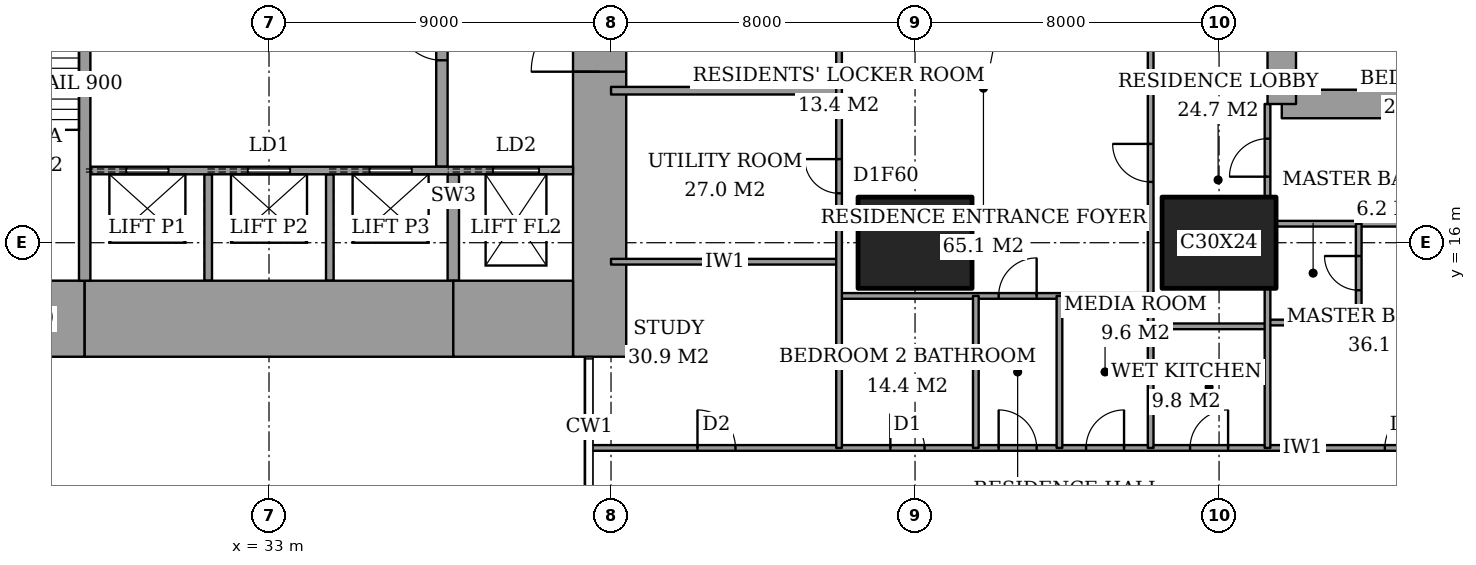
"""IFC4 building model, lengths in metres.
Left out: names, types, materials, properties, quantities, classifications, styles, units other than length and angle.
Written with IfcOpenShell. Run it as: python <this file> out.ifc"""

import sys

from ifc_helpers import new_model, si_unit, direction, frame, frame_2d, origin, origin_2d, place, context, subcontext, project, spatial, rectangle, extrude, element, fill, save


model = new_model("IFC4")
c1 = context("Model", 3, precision=1e-05, world=origin(), true_north=direction((0.0, 1.0)))
c2 = subcontext(c1, "Body", "Model", "MODEL_VIEW")
j1 = project(units=[si_unit("LENGTHUNIT", "METRE"), si_unit("PLANEANGLEUNIT", "RADIAN")], contexts=[c1])
p1 = place(None, origin())
s1 = spatial("IfcSite", under=j1, at=p1, CompositionType="ELEMENT")
p2 = place(p1, origin())
s2 = spatial("IfcBuilding", under=s1, at=p2, CompositionType="ELEMENT")
p3 = place(p2, frame((0.0, 0.0, 36.8)))
s3 = spatial("IfcBuildingStorey", under=s2, at=p3, CompositionType="ELEMENT", Elevation=36.8)
for number, where, z_axis, x_axis in (
    (1, (50.0, 16.0, 0.0), (0.0, 0.0, 1.0), (1.0, 0.0, 0.0)),
    (2, (58.0, 16.0, 0.0), (0.0, 0.0, 1.0), (1.0, 0.0, 0.0)),
):
    element("IfcColumn", number, at=place(p3, frame(where, z_axis=z_axis, x_axis=x_axis)), inside=s3, PredefinedType="COLUMN", context=c2, shape_type="SweptSolid", body=[
        extrude(rectangle(XDim=3.0, YDim=2.4, at=origin_2d()), origin(), (0.0, 0.0, 1.0), 3.6),
    ])
p4 = place(p3, frame((25.0, 14.0, 0.0), z_axis=(0.0, 0.0, 1.0), x_axis=(1.0, 0.0, 0.0)))
e3 = element("IfcWall", 3, at=p4, inside=s3, PredefinedType="SHEAR", context=c2, shape_type="SweptSolid", body=[
    extrude(rectangle(XDim=3.15, YDim=2.0, at=frame_2d((1.575, 0.0))), origin(), (0.0, 0.0, 1.0), 3.6),
])
p5 = place(p3, frame((28.15, 14.0, 0.0), z_axis=(0.0, 0.0, 1.0), x_axis=(1.0, 0.0, 0.0)))
e4 = element("IfcWall", 4, at=p5, inside=s3, PredefinedType="SHEAR", context=c2, shape_type="SweptSolid", body=[
    extrude(rectangle(XDim=9.7, YDim=2.0, at=frame_2d((4.85, 0.0))), origin(), (0.0, 0.0, 1.0), 3.6),
])
p6 = place(p3, frame((37.85, 14.0, 0.0), z_axis=(0.0, 0.0, 1.0), x_axis=(1.0, 0.0, 0.0)))
e5 = element("IfcWall", 5, at=p6, inside=s3, PredefinedType="SHEAR", context=c2, shape_type="SweptSolid", body=[
    extrude(rectangle(XDim=3.15, YDim=2.0, at=frame_2d((1.575, 0.0))), origin(), (0.0, 0.0, 1.0), 3.6),
])
p7 = place(p3, frame((41.7, 13.0, 0.0), z_axis=(0.0, 0.0, 1.0), x_axis=(0.0, 1.0, 0.0)))
e6 = element("IfcWall", 6, at=p7, inside=s3, PredefinedType="SHEAR", context=c2, shape_type="SweptSolid", body=[
    extrude(rectangle(XDim=11.85, YDim=1.4, at=frame_2d((5.925, 0.0))), origin(), (0.0, 0.0, 1.0), 3.6),
])
p8 = place(p7, frame((7.5, 0.0, 0.0)))
e7 = element("IfcOpeningElement", 7, at=p8, cuts=e6, PredefinedType="OPENING", context=c2, shape_type="SweptSolid", body=[
    extrude(rectangle(XDim=1.8, YDim=2.4, at=frame_2d((0.9, 1.2))), frame((0.0, 0.71, 0.0), z_axis=(0.0, -1.0, 0.0), x_axis=(1.0, 0.0, 0.0)), (0.0, 0.0, 1.0), 1.42),
])
p9 = place(p3, frame((28.15, 15.0, 0.0), z_axis=(0.0, 0.0, 1.0), x_axis=(0.0, 1.0, 0.0)))
e8 = element("IfcWall", 8, at=p9, inside=s3, PredefinedType="SHEAR", context=c2, shape_type="SweptSolid", body=[
    extrude(rectangle(XDim=8.15, YDim=0.3, at=frame_2d((4.075, 0.0))), origin(), (0.0, 0.0, 1.0), 3.6),
])
p10 = place(p3, frame((37.55, 18.0, 0.0), z_axis=(0.0, 0.0, 1.0), x_axis=(0.0, 1.0, 0.0)))
e9 = element("IfcWall", 9, at=p10, inside=s3, PredefinedType="PARTITIONING", context=c2, shape_type="SweptSolid", body=[
    extrude(rectangle(XDim=6.7, YDim=0.3, at=frame_2d((3.35, 0.0))), origin(), (0.0, 0.0, 1.0), 3.6),
])
p11 = place(p10, frame((2.8, 0.0, 0.0)))
e10 = element("IfcOpeningElement", 10, at=p11, cuts=e9, PredefinedType="OPENING", context=c2, shape_type="SweptSolid", body=[
    extrude(rectangle(XDim=1.2, YDim=2.1, at=frame_2d((0.6, 1.05))), frame((0.0, 0.16, 0.0), z_axis=(0.0, -1.0, 0.0), x_axis=(1.0, 0.0, 0.0)), (0.0, 0.0, 1.0), 0.32),
])
p12 = place(p3, frame((59.65, 19.65, 0.0), z_axis=(0.0, 0.0, 1.0), x_axis=(1.0, 0.0, 0.0)))
e11 = element("IfcWall", 11, at=p12, inside=s3, PredefinedType="SHEAR", context=c2, shape_type="SweptSolid", body=[
    extrude(rectangle(XDim=4.45, YDim=0.75, at=frame_2d((2.225, 0.0))), origin(), (0.0, 0.0, 1.0), 3.6),
])
p13 = place(p3, frame((59.65, 28.35, 0.0), z_axis=(0.0, 0.0, 1.0), x_axis=(0.0, -1.0, 0.0)))
e12 = element("IfcWall", 12, at=p13, inside=s3, PredefinedType="SHEAR", context=c2, shape_type="SweptSolid", body=[
    extrude(rectangle(XDim=8.7, YDim=0.75, at=frame_2d((4.35, 0.0))), origin(), (0.0, 0.0, 1.0), 3.6),
])
p14 = place(p13, frame((0.975, 0.0, 0.0)))
e13 = element("IfcOpeningElement", 13, at=p14, cuts=e12, PredefinedType="OPENING", context=c2, shape_type="SweptSolid", body=[
    extrude(rectangle(XDim=1.0, YDim=2.1, at=frame_2d((0.5, 1.05))), frame((0.0, 0.385, 0.0), z_axis=(0.0, -1.0, 0.0), x_axis=(1.0, 0.0, 0.0)), (0.0, 0.0, 1.0), 0.77),
])
p15 = place(p3, frame((41.439, 10.6, 0.0), z_axis=(0.0, 0.0, 1.0), x_axis=(1.0, 0.0, 0.0)))
e14 = element("IfcWall", 14, at=p15, inside=s3, PredefinedType="PARTITIONING", context=c2, shape_type="SweptSolid", body=[
    extrude(rectangle(XDim=25.011, YDim=0.15, at=frame_2d((12.505, 0.0))), origin(), (0.0, 0.0, 1.0), 3.35),
])
p16 = place(p15, frame((10.761, 0.0, 0.0)))
e15 = element("IfcOpeningElement", 15, at=p16, cuts=e14, PredefinedType="OPENING", context=c2, shape_type="SweptSolid", body=[
    extrude(rectangle(XDim=1.0, YDim=2.1, at=frame_2d((0.5, 1.05))), frame((0.0, 0.085, 0.0), z_axis=(0.0, -1.0, 0.0), x_axis=(1.0, 0.0, 0.0)), (0.0, 0.0, 1.0), 0.17),
])
p17 = place(p15, frame((20.924, 0.0, 0.0)))
e16 = element("IfcOpeningElement", 16, at=p17, cuts=e14, PredefinedType="OPENING", context=c2, shape_type="SweptSolid", body=[
    extrude(rectangle(XDim=1.0, YDim=2.1, at=frame_2d((0.5, 1.05))), frame((0.0, 0.085, 0.0), z_axis=(0.0, -1.0, 0.0), x_axis=(1.0, 0.0, 0.0)), (0.0, 0.0, 1.0), 0.17),
])
p18 = place(p15, frame((15.799, 0.0, 0.0)))
e17 = element("IfcOpeningElement", 17, at=p18, cuts=e14, PredefinedType="OPENING", context=c2, shape_type="SweptSolid", body=[
    extrude(rectangle(XDim=1.0, YDim=2.1, at=frame_2d((0.5, 1.05))), frame((0.0, 0.085, 0.0), z_axis=(0.0, -1.0, 0.0), x_axis=(1.0, 0.0, 0.0)), (0.0, 0.0, 1.0), 0.17),
])
p19 = place(p15, frame((13.061, 0.0, 0.0)))
e18 = element("IfcOpeningElement", 18, at=p19, cuts=e14, PredefinedType="OPENING", context=c2, shape_type="SweptSolid", body=[
    extrude(rectangle(XDim=1.0, YDim=2.1, at=frame_2d((0.5, 1.05))), frame((0.0, 0.085, 0.0), z_axis=(0.0, -1.0, 0.0), x_axis=(1.0, 0.0, 0.0)), (0.0, 0.0, 1.0), 0.17),
])
p20 = place(p15, frame((7.911, 0.0, 0.0)))
e19 = element("IfcOpeningElement", 19, at=p20, cuts=e14, PredefinedType="OPENING", context=c2, shape_type="SweptSolid", body=[
    extrude(rectangle(XDim=0.9, YDim=2.1, at=frame_2d((0.45, 1.05))), frame((0.0, 0.085, 0.0), z_axis=(0.0, -1.0, 0.0), x_axis=(1.0, 0.0, 0.0)), (0.0, 0.0, 1.0), 0.17),
])
p21 = place(p15, frame((2.836, 0.0, 0.0)))
e20 = element("IfcOpeningElement", 20, at=p21, cuts=e14, PredefinedType="OPENING", context=c2, shape_type="SweptSolid", body=[
    extrude(rectangle(XDim=1.0, YDim=2.1, at=frame_2d((0.5, 1.05))), frame((0.0, 0.085, 0.0), z_axis=(0.0, -1.0, 0.0), x_axis=(1.0, 0.0, 0.0)), (0.0, 0.0, 1.0), 0.17),
])
p22 = place(p3, frame((56.2, 13.8, 0.0), z_axis=(0.0, 0.0, 1.0), x_axis=(1.0, 0.0, 0.0)))
e21 = element("IfcWall", 21, at=p22, inside=s3, PredefinedType="PARTITIONING", context=c2, shape_type="SweptSolid", body=[
    extrude(rectangle(XDim=3.075, YDim=0.15, at=frame_2d((1.538, 0.0))), origin(), (0.0, 0.0, 1.0), 3.35),
])
p23 = place(p3, frame((59.275, 13.9, 0.0), z_axis=(0.0, 0.0, 1.0), x_axis=(1.0, 0.0, 0.0)))
e22 = element("IfcWall", 22, at=p23, inside=s3, PredefinedType="PARTITIONING", context=c2, shape_type="SweptSolid", body=[
    extrude(rectangle(XDim=2.4, YDim=0.15, at=frame_2d((1.2, 0.0))), origin(), (0.0, 0.0, 1.0), 3.35),
])
p24 = place(p3, frame((48.0, 14.6, 0.0), z_axis=(0.0, 0.0, 1.0), x_axis=(1.0, 0.0, 0.0)))
e23 = element("IfcWall", 23, at=p24, inside=s3, PredefinedType="PARTITIONING", context=c2, shape_type="SweptSolid", body=[
    extrude(rectangle(XDim=8.2, YDim=0.15, at=frame_2d((4.1, 0.0))), origin(), (0.0, 0.0, 1.0), 3.35),
])
p25 = place(p24, frame((4.2, 0.0, 0.0)))
e24 = element("IfcOpeningElement", 24, at=p25, cuts=e23, PredefinedType="OPENING", context=c2, shape_type="SweptSolid", body=[
    extrude(rectangle(XDim=1.0, YDim=2.1, at=frame_2d((0.5, 1.05))), frame((0.0, 0.085, 0.0), z_axis=(0.0, -1.0, 0.0), x_axis=(1.0, 0.0, 0.0)), (0.0, 0.0, 1.0), 0.17),
])
p26 = place(p3, frame((42.0, 15.5, 0.0), z_axis=(0.0, 0.0, 1.0), x_axis=(1.0, 0.0, 0.0)))
e25 = element("IfcWall", 25, at=p26, inside=s3, PredefinedType="PARTITIONING", context=c2, shape_type="SweptSolid", body=[
    extrude(rectangle(XDim=6.0, YDim=0.15, at=frame_2d((3.0, 0.0))), origin(), (0.0, 0.0, 1.0), 3.35),
])
p27 = place(p3, frame((59.5, 16.5, 0.0), z_axis=(0.0, 0.0, 1.0), x_axis=(1.0, 0.0, 0.0)))
e26 = element("IfcWall", 26, at=p27, inside=s3, PredefinedType="PARTITIONING", context=c2, shape_type="SweptSolid", body=[
    extrude(rectangle(XDim=5.15, YDim=0.15, at=frame_2d((2.575, 0.0))), origin(), (0.0, 0.0, 1.0), 3.35),
])
p28 = place(p3, frame((42.0, 20.0, 0.0), z_axis=(0.0, 0.0, 1.0), x_axis=(1.0, 0.0, 0.0)))
e27 = element("IfcWall", 27, at=p28, inside=s3, PredefinedType="PARTITIONING", context=c2, shape_type="SweptSolid", body=[
    extrude(rectangle(XDim=6.0, YDim=0.2, at=frame_2d((3.0, 0.0))), origin(), (0.0, 0.0, 1.0), 3.35),
])
p29 = place(p3, frame((48.0, 10.6, 0.0), z_axis=(0.0, 0.0, 1.0), x_axis=(0.0, 1.0, 0.0)))
e28 = element("IfcWall", 28, at=p29, inside=s3, PredefinedType="PARTITIONING", context=c2, shape_type="SweptSolid", body=[
    extrude(rectangle(XDim=13.4, YDim=0.15, at=frame_2d((6.7, 0.0))), origin(), (0.0, 0.0, 1.0), 3.35),
])
p30 = place(p29, frame((10.8, 0.0, 0.0)))
e29 = element("IfcOpeningElement", 29, at=p30, cuts=e28, PredefinedType="OPENING", context=c2, shape_type="SweptSolid", body=[
    extrude(rectangle(XDim=1.2, YDim=2.4, at=frame_2d((0.6, 1.2))), frame((0.0, 0.085, 0.0), z_axis=(0.0, -1.0, 0.0), x_axis=(1.0, 0.0, 0.0)), (0.0, 0.0, 1.0), 0.17),
])
p31 = place(p29, frame((6.7, 0.0, 0.0)))
e30 = element("IfcOpeningElement", 30, at=p31, cuts=e28, PredefinedType="OPENING", context=c2, shape_type="SweptSolid", body=[
    extrude(rectangle(XDim=0.9, YDim=2.1, at=frame_2d((0.45, 1.05))), frame((0.0, 0.085, 0.0), z_axis=(0.0, -1.0, 0.0), x_axis=(1.0, 0.0, 0.0)), (0.0, 0.0, 1.0), 0.17),
])
for number, where, z_axis, x_axis in (
    (31, (51.6, 10.6, 0.0), (0.0, 0.0, 1.0), (0.0, 1.0, 0.0)),
    (32, (53.8, 10.6, 0.0), (0.0, 0.0, 1.0), (0.0, 1.0, 0.0)),
):
    element("IfcWall", number, at=place(p3, frame(where, z_axis=z_axis, x_axis=x_axis)), inside=s3, PredefinedType="PARTITIONING", context=c2, shape_type="SweptSolid", body=[
        extrude(rectangle(XDim=4.0, YDim=0.15, at=frame_2d((2.0, 0.0))), origin(), (0.0, 0.0, 1.0), 3.35),
    ])
p32 = place(p3, frame((56.2, 10.6, 0.0), z_axis=(0.0, 0.0, 1.0), x_axis=(0.0, 1.0, 0.0)))
e33 = element("IfcWall", 33, at=p32, inside=s3, PredefinedType="PARTITIONING", context=c2, shape_type="SweptSolid", body=[
    extrude(rectangle(XDim=11.0, YDim=0.15, at=frame_2d((5.5, 0.0))), origin(), (0.0, 0.0, 1.0), 3.35),
])
p33 = place(p32, frame((7.0, 0.0, 0.0)))
e34 = element("IfcOpeningElement", 34, at=p33, cuts=e33, PredefinedType="OPENING", context=c2, shape_type="SweptSolid", body=[
    extrude(rectangle(XDim=1.0, YDim=2.1, at=frame_2d((0.5, 1.05))), frame((0.0, 0.085, 0.0), z_axis=(0.0, -1.0, 0.0), x_axis=(1.0, 0.0, 0.0)), (0.0, 0.0, 1.0), 0.17),
])
p34 = place(p3, frame((59.275, 10.6, 0.0), z_axis=(0.0, 0.0, 1.0), x_axis=(0.0, 1.0, 0.0)))
e35 = element("IfcWall", 35, at=p34, inside=s3, PredefinedType="PARTITIONING", context=c2, shape_type="SweptSolid", body=[
    extrude(rectangle(XDim=4.2, YDim=0.15, at=frame_2d((2.1, 0.0))), origin(), (0.0, 0.0, 1.0), 3.35),
])
p35 = place(p3, frame((59.275, 17.2, 0.0), z_axis=(0.0, 0.0, 1.0), x_axis=(0.0, 1.0, 0.0)))
e36 = element("IfcWall", 36, at=p35, inside=s3, PredefinedType="PARTITIONING", context=c2, shape_type="SweptSolid", body=[
    extrude(rectangle(XDim=2.45, YDim=0.15, at=frame_2d((1.225, 0.0))), origin(), (0.0, 0.0, 1.0), 3.35),
])
p36 = place(p35, frame((0.538, 0.0, 0.0)))
e37 = element("IfcOpeningElement", 37, at=p36, cuts=e36, PredefinedType="OPENING", context=c2, shape_type="SweptSolid", body=[
    extrude(rectangle(XDim=1.0, YDim=2.1, at=frame_2d((0.5, 1.05))), frame((0.0, 0.085, 0.0), z_axis=(0.0, -1.0, 0.0), x_axis=(1.0, 0.0, 0.0)), (0.0, 0.0, 1.0), 0.17),
])
p37 = place(p3, frame((61.675, 13.9, 0.0), z_axis=(0.0, 0.0, 1.0), x_axis=(0.0, 1.0, 0.0)))
e38 = element("IfcWall", 38, at=p37, inside=s3, PredefinedType="PARTITIONING", context=c2, shape_type="SweptSolid", body=[
    extrude(rectangle(XDim=2.6, YDim=0.15, at=frame_2d((1.3, 0.0))), origin(), (0.0, 0.0, 1.0), 3.35),
])
p38 = place(p37, frame((0.85, 0.0, 0.0)))
e39 = element("IfcOpeningElement", 39, at=p38, cuts=e38, PredefinedType="OPENING", context=c2, shape_type="SweptSolid", body=[
    extrude(rectangle(XDim=0.9, YDim=2.1, at=frame_2d((0.45, 1.05))), frame((0.0, 0.085, 0.0), z_axis=(0.0, -1.0, 0.0), x_axis=(1.0, 0.0, 0.0)), (0.0, 0.0, 1.0), 0.17),
])
p39 = place(p3, frame((28.3, 17.9, 0.0), z_axis=(0.0, 0.0, 1.0), x_axis=(1.0, 0.0, 0.0)))
e40 = element("IfcWall", 40, at=p39, inside=s3, PredefinedType="PARTITIONING", context=c2, shape_type="SweptSolid", body=[
    extrude(rectangle(XDim=12.7, YDim=0.2, at=frame_2d((6.35, 0.0))), origin(), (0.0, 0.0, 1.0), 3.6),
])
p40 = place(p39, frame((0.95, 0.0, 0.0)))
e41 = element("IfcOpeningElement", 41, at=p40, cuts=e40, PredefinedType="OPENING", context=c2, shape_type="SweptSolid", body=[
    extrude(rectangle(XDim=1.1, YDim=2.1, at=frame_2d((0.55, 1.05))), frame((0.0, 0.11, 0.0), z_axis=(0.0, -1.0, 0.0), x_axis=(1.0, 0.0, 0.0)), (0.0, 0.0, 1.0), 0.22),
])
p41 = place(p39, frame((4.15, 0.0, 0.0)))
e42 = element("IfcOpeningElement", 42, at=p41, cuts=e40, PredefinedType="OPENING", context=c2, shape_type="SweptSolid", body=[
    extrude(rectangle(XDim=1.1, YDim=2.1, at=frame_2d((0.55, 1.05))), frame((0.0, 0.11, 0.0), z_axis=(0.0, -1.0, 0.0), x_axis=(1.0, 0.0, 0.0)), (0.0, 0.0, 1.0), 0.22),
])
p42 = place(p39, frame((7.35, 0.0, 0.0)))
e43 = element("IfcOpeningElement", 43, at=p42, cuts=e40, PredefinedType="OPENING", context=c2, shape_type="SweptSolid", body=[
    extrude(rectangle(XDim=1.1, YDim=2.1, at=frame_2d((0.55, 1.05))), frame((0.0, 0.11, 0.0), z_axis=(0.0, -1.0, 0.0), x_axis=(1.0, 0.0, 0.0)), (0.0, 0.0, 1.0), 0.22),
])
p43 = place(p39, frame((10.6, 0.0, 0.0)))
e44 = element("IfcOpeningElement", 44, at=p43, cuts=e40, PredefinedType="OPENING", context=c2, shape_type="SweptSolid", body=[
    extrude(rectangle(XDim=1.2, YDim=2.1, at=frame_2d((0.6, 1.05))), frame((0.0, 0.11, 0.0), z_axis=(0.0, -1.0, 0.0), x_axis=(1.0, 0.0, 0.0)), (0.0, 0.0, 1.0), 0.22),
])
for number, where, z_axis, x_axis in (
    (45, (31.4, 15.0, 0.0), (0.0, 0.0, 1.0), (0.0, 1.0, 0.0)),
    (46, (34.6, 15.0, 0.0), (0.0, 0.0, 1.0), (0.0, 1.0, 0.0)),
):
    element("IfcWall", number, at=place(p3, frame(where, z_axis=z_axis, x_axis=x_axis)), inside=s3, PredefinedType="PARTITIONING", context=c2, shape_type="SweptSolid", body=[
        extrude(rectangle(XDim=2.8, YDim=0.2, at=frame_2d((1.4, 0.0))), origin(), (0.0, 0.0, 1.0), 3.6),
    ])
p44 = place(p3, frame((37.85, 15.0, 0.0), z_axis=(0.0, 0.0, 1.0), x_axis=(0.0, 1.0, 0.0)))
e47 = element("IfcWall", 47, at=p44, inside=s3, PredefinedType="SHEAR", context=c2, shape_type="SweptSolid", body=[
    extrude(rectangle(XDim=2.8, YDim=0.3, at=frame_2d((1.4, 0.0))), origin(), (0.0, 0.0, 1.0), 3.6),
])
p45 = place(p16, origin())
e48 = element("IfcDoor", 48, at=p45, inside=s3, OperationType="SINGLE_SWING_RIGHT", PredefinedType="DOOR", context=c2, shape_type="SweptSolid", body=[
    extrude(rectangle(XDim=1.0, YDim=2.1, at=frame_2d((0.5, 1.05))), frame((0.0, 0.025, 0.0), z_axis=(0.0, -1.0, 0.0), x_axis=(1.0, 0.0, 0.0)), (0.0, 0.0, 1.0), 0.05),
])
fill(e15, e48)
p46 = place(p38, origin())
e49 = element("IfcDoor", 49, at=p46, inside=s3, OperationType="SINGLE_SWING_LEFT", PredefinedType="DOOR", context=c2, shape_type="SweptSolid", body=[
    extrude(rectangle(XDim=0.9, YDim=2.1, at=frame_2d((0.45, 1.05))), frame((0.0, 0.025, 0.0), z_axis=(0.0, -1.0, 0.0), x_axis=(1.0, 0.0, 0.0)), (0.0, 0.0, 1.0), 0.05),
])
fill(e39, e49)
p47 = place(p17, origin())
e50 = element("IfcDoor", 50, at=p47, inside=s3, OperationType="SINGLE_SWING_LEFT", PredefinedType="DOOR", context=c2, shape_type="SweptSolid", body=[
    extrude(rectangle(XDim=1.0, YDim=2.1, at=frame_2d((0.5, 1.05))), frame((0.0, 0.025, 0.0), z_axis=(0.0, -1.0, 0.0), x_axis=(1.0, 0.0, 0.0)), (0.0, 0.0, 1.0), 0.05),
])
fill(e16, e50)
p48 = place(p36, origin())
e51 = element("IfcDoor", 51, at=p48, inside=s3, OperationType="SINGLE_SWING_RIGHT", PredefinedType="DOOR", context=c2, shape_type="SweptSolid", body=[
    extrude(rectangle(XDim=1.0, YDim=2.1, at=frame_2d((0.5, 1.05))), frame((0.0, 0.025, 0.0), z_axis=(0.0, -1.0, 0.0), x_axis=(1.0, 0.0, 0.0)), (0.0, 0.0, 1.0), 0.05),
])
fill(e37, e51)
p49 = place(p18, origin())
e52 = element("IfcDoor", 52, at=p49, inside=s3, OperationType="SINGLE_SWING_LEFT", PredefinedType="DOOR", context=c2, shape_type="SweptSolid", body=[
    extrude(rectangle(XDim=1.0, YDim=2.1, at=frame_2d((0.5, 1.05))), frame((0.0, 0.025, 0.0), z_axis=(0.0, -1.0, 0.0), x_axis=(1.0, 0.0, 0.0)), (0.0, 0.0, 1.0), 0.05),
])
fill(e17, e52)
p50 = place(p33, origin())
e53 = element("IfcDoor", 53, at=p50, inside=s3, OperationType="SINGLE_SWING_LEFT", PredefinedType="DOOR", context=c2, shape_type="SweptSolid", body=[
    extrude(rectangle(XDim=1.0, YDim=2.1, at=frame_2d((0.5, 1.05))), frame((0.0, 0.025, 0.0), z_axis=(0.0, -1.0, 0.0), x_axis=(1.0, 0.0, 0.0)), (0.0, 0.0, 1.0), 0.05),
])
fill(e34, e53)
p51 = place(p19, origin())
e54 = element("IfcDoor", 54, at=p51, inside=s3, OperationType="SINGLE_SWING_LEFT", PredefinedType="DOOR", context=c2, shape_type="SweptSolid", body=[
    extrude(rectangle(XDim=1.0, YDim=2.1, at=frame_2d((0.5, 1.05))), frame((0.0, 0.025, 0.0), z_axis=(0.0, -1.0, 0.0), x_axis=(1.0, 0.0, 0.0)), (0.0, 0.0, 1.0), 0.05),
])
fill(e18, e54)
p52 = place(p25, origin())
e55 = element("IfcDoor", 55, at=p52, inside=s3, OperationType="SINGLE_SWING_LEFT", PredefinedType="DOOR", context=c2, shape_type="SweptSolid", body=[
    extrude(rectangle(XDim=1.0, YDim=2.1, at=frame_2d((0.5, 1.05))), frame((0.0, 0.025, 0.0), z_axis=(0.0, -1.0, 0.0), x_axis=(1.0, 0.0, 0.0)), (0.0, 0.0, 1.0), 0.05),
])
fill(e24, e55)
p53 = place(p20, origin())
e56 = element("IfcDoor", 56, at=p53, inside=s3, OperationType="SINGLE_SWING_RIGHT", PredefinedType="DOOR", context=c2, shape_type="SweptSolid", body=[
    extrude(rectangle(XDim=0.9, YDim=2.1, at=frame_2d((0.45, 1.05))), frame((0.0, 0.025, 0.0), z_axis=(0.0, -1.0, 0.0), x_axis=(1.0, 0.0, 0.0)), (0.0, 0.0, 1.0), 0.05),
])
fill(e19, e56)
p54 = place(p21, origin())
e57 = element("IfcDoor", 57, at=p54, inside=s3, OperationType="SINGLE_SWING_RIGHT", PredefinedType="DOOR", context=c2, shape_type="SweptSolid", body=[
    extrude(rectangle(XDim=1.0, YDim=2.1, at=frame_2d((0.5, 1.05))), frame((0.0, 0.025, 0.0), z_axis=(0.0, -1.0, 0.0), x_axis=(1.0, 0.0, 0.0)), (0.0, 0.0, 1.0), 0.05),
])
fill(e20, e57)
p55 = place(p31, origin())
e58 = element("IfcDoor", 58, at=p55, inside=s3, OperationType="SINGLE_SWING_LEFT", PredefinedType="DOOR", context=c2, shape_type="SweptSolid", body=[
    extrude(rectangle(XDim=0.9, YDim=2.1, at=frame_2d((0.45, 1.05))), frame((0.0, 0.025, 0.0), z_axis=(0.0, -1.0, 0.0), x_axis=(1.0, 0.0, 0.0)), (0.0, 0.0, 1.0), 0.05),
])
fill(e30, e58)
p56 = place(p11, origin())
e59 = element("IfcDoor", 59, at=p56, inside=s3, OperationType="SINGLE_SWING_LEFT", PredefinedType="DOOR", context=c2, shape_type="SweptSolid", body=[
    extrude(rectangle(XDim=1.2, YDim=2.1, at=frame_2d((0.6, 1.05))), frame((0.0, 0.025, 0.0), z_axis=(0.0, -1.0, 0.0), x_axis=(1.0, 0.0, 0.0)), (0.0, 0.0, 1.0), 0.05),
])
fill(e10, e59)
p57 = place(p8, origin())
e60 = element("IfcDoor", 60, at=p57, inside=s3, OperationType="DOUBLE_DOOR_DOUBLE_SWING", PredefinedType="DOOR", context=c2, shape_type="SweptSolid", body=[
    extrude(rectangle(XDim=1.8, YDim=2.4, at=frame_2d((0.9, 1.2))), frame((0.0, 0.025, 0.0), z_axis=(0.0, -1.0, 0.0), x_axis=(1.0, 0.0, 0.0)), (0.0, 0.0, 1.0), 0.05),
])
fill(e7, e60)
p58 = place(p40, origin())
e61 = element("IfcDoor", 61, at=p58, inside=s3, OperationType="SLIDING_TO_LEFT", PredefinedType="DOOR", context=c2, shape_type="SweptSolid", body=[
    extrude(rectangle(XDim=1.1, YDim=2.1, at=frame_2d((0.55, 1.05))), frame((0.0, 0.025, 0.0), z_axis=(0.0, -1.0, 0.0), x_axis=(1.0, 0.0, 0.0)), (0.0, 0.0, 1.0), 0.05),
])
fill(e41, e61)
p59 = place(p41, origin())
e62 = element("IfcDoor", 62, at=p59, inside=s3, OperationType="SLIDING_TO_LEFT", PredefinedType="DOOR", context=c2, shape_type="SweptSolid", body=[
    extrude(rectangle(XDim=1.1, YDim=2.1, at=frame_2d((0.55, 1.05))), frame((0.0, 0.025, 0.0), z_axis=(0.0, -1.0, 0.0), x_axis=(1.0, 0.0, 0.0)), (0.0, 0.0, 1.0), 0.05),
])
fill(e42, e62)
p60 = place(p42, origin())
e63 = element("IfcDoor", 63, at=p60, inside=s3, OperationType="SLIDING_TO_LEFT", PredefinedType="DOOR", context=c2, shape_type="SweptSolid", body=[
    extrude(rectangle(XDim=1.1, YDim=2.1, at=frame_2d((0.55, 1.05))), frame((0.0, 0.025, 0.0), z_axis=(0.0, -1.0, 0.0), x_axis=(1.0, 0.0, 0.0)), (0.0, 0.0, 1.0), 0.05),
])
fill(e43, e63)
p61 = place(p43, origin())
e64 = element("IfcDoor", 64, at=p61, inside=s3, OperationType="SLIDING_TO_LEFT", PredefinedType="DOOR", context=c2, shape_type="SweptSolid", body=[
    extrude(rectangle(XDim=1.2, YDim=2.1, at=frame_2d((0.6, 1.05))), frame((0.0, 0.025, 0.0), z_axis=(0.0, -1.0, 0.0), x_axis=(1.0, 0.0, 0.0)), (0.0, 0.0, 1.0), 0.05),
])
fill(e44, e64)
save(model, sys.argv[1])
